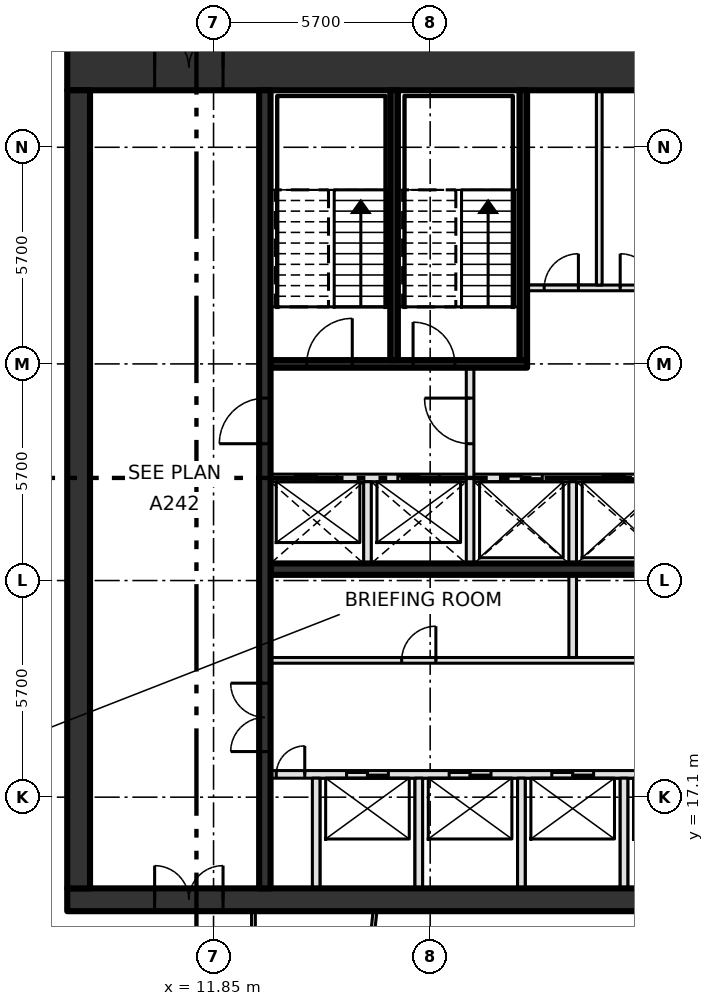
"""IFC4 building model, lengths in metres.
Left out: names, types, materials, properties, quantities, classifications, styles, units other than length and angle.
Written with IfcOpenShell. Run it as: python <this file> out.ifc"""

import sys

from ifc_helpers import new_model, si_unit, direction, frame, frame_2d, origin, place, context, subcontext, project, spatial, rectangle, extrude, element, fill, save


model = new_model("IFC4")
c1 = context("Model", 3, precision=1e-05, world=origin(), true_north=direction((0.0, 1.0)))
c2 = subcontext(c1, "Body", "Model", "MODEL_VIEW")
j1 = project(units=[si_unit("LENGTHUNIT", "METRE"), si_unit("PLANEANGLEUNIT", "RADIAN")], contexts=[c1])
p1 = place(None, origin())
s1 = spatial("IfcSite", under=j1, at=p1, CompositionType="ELEMENT")
p2 = place(p1, origin())
s2 = spatial("IfcBuilding", under=s1, at=p2, CompositionType="ELEMENT")
p3 = place(p2, frame((0.0, 0.0, 323.4)))
s3 = spatial("IfcBuildingStorey", under=s2, at=p3, CompositionType="ELEMENT", Elevation=323.4)
p4 = place(p3, frame((8.0, 14.4, -0.3), z_axis=(0.0, 0.0, 1.0), x_axis=(1.0, 0.0, 0.0)))
e1 = element("IfcWall", 1, at=p4, inside=s3, PredefinedType="SHEAR", context=c2, shape_type="SweptSolid", body=[
    extrude(rectangle(XDim=22.8, YDim=0.6, at=frame_2d((11.4, 0.0))), origin(), (0.0, 0.0, 1.0), 4.2),
])
p5 = place(p4, frame((2.3, 0.0, 0.3)))
e2 = element("IfcOpeningElement", 2, at=p5, cuts=e1, PredefinedType="OPENING", context=c2, shape_type="SweptSolid", body=[
    extrude(rectangle(XDim=1.8, YDim=2.1, at=frame_2d((0.9, 1.05))), frame((0.0, 0.31, 0.0), z_axis=(0.0, -1.0, 0.0), x_axis=(1.0, 0.0, 0.0)), (0.0, 0.0, 1.0), 0.62),
])
p6 = place(p3, frame((8.0, 36.3, -0.3), z_axis=(0.0, 0.0, 1.0), x_axis=(1.0, 0.0, 0.0)))
e3 = element("IfcWall", 3, at=p6, inside=s3, PredefinedType="SHEAR", context=c2, shape_type="SweptSolid", body=[
    extrude(rectangle(XDim=22.8, YDim=1.2, at=frame_2d((11.4, 0.0))), origin(), (0.0, 0.0, 1.0), 4.2),
])
p7 = place(p6, frame((2.3, 0.0, 0.3)))
e4 = element("IfcOpeningElement", 4, at=p7, cuts=e3, PredefinedType="OPENING", context=c2, shape_type="SweptSolid", body=[
    extrude(rectangle(XDim=1.8, YDim=2.1, at=frame_2d((0.9, 1.05))), frame((0.0, 0.61, 0.0), z_axis=(0.0, -1.0, 0.0), x_axis=(1.0, 0.0, 0.0)), (0.0, 0.0, 1.0), 1.22),
])
p8 = place(p3, frame((8.3, 14.7, -0.3), z_axis=(0.0, 0.0, 1.0), x_axis=(0.0, 1.0, 0.0)))
e5 = element("IfcWall", 5, at=p8, inside=s3, PredefinedType="SHEAR", context=c2, shape_type="SweptSolid", body=[
    extrude(rectangle(XDim=21.0, YDim=0.6, at=frame_2d((10.5, 0.0))), origin(), (0.0, 0.0, 1.0), 4.2),
])
p9 = place(p3, frame((13.35, 17.7, 0.0), z_axis=(0.0, 0.0, 1.0), x_axis=(1.0, 0.0, 0.0)))
e6 = element("IfcWall", 6, at=p9, inside=s3, PredefinedType="SOLIDWALL", context=c2, shape_type="SweptSolid", body=[
    extrude(rectangle(XDim=13.425, YDim=0.2, at=frame_2d((6.712, 0.0))), origin(), (0.0, 0.0, 1.0), 3.9),
])
p10 = place(p9, frame((2.0, 0.0, 0.0)))
e7 = element("IfcOpeningElement", 7, at=p10, cuts=e6, PredefinedType="OPENING", context=c2, shape_type="SweptSolid", body=[
    extrude(rectangle(XDim=1.1, YDim=2.1, at=frame_2d((0.55, 1.05))), frame((0.0, 0.11, 0.0), z_axis=(0.0, -1.0, 0.0), x_axis=(1.0, 0.0, 0.0)), (0.0, 0.0, 1.0), 0.22),
])
p11 = place(p9, frame((4.7, 0.0, 0.0)))
e8 = element("IfcOpeningElement", 8, at=p11, cuts=e6, PredefinedType="OPENING", context=c2, shape_type="SweptSolid", body=[
    extrude(rectangle(XDim=1.1, YDim=2.1, at=frame_2d((0.55, 1.05))), frame((0.0, 0.11, 0.0), z_axis=(0.0, -1.0, 0.0), x_axis=(1.0, 0.0, 0.0)), (0.0, 0.0, 1.0), 0.22),
])
p12 = place(p9, frame((7.4, 0.0, 0.0)))
e9 = element("IfcOpeningElement", 9, at=p12, cuts=e6, PredefinedType="OPENING", context=c2, shape_type="SweptSolid", body=[
    extrude(rectangle(XDim=1.1, YDim=2.1, at=frame_2d((0.55, 1.05))), frame((0.0, 0.11, 0.0), z_axis=(0.0, -1.0, 0.0), x_axis=(1.0, 0.0, 0.0)), (0.0, 0.0, 1.0), 0.22),
])
p13 = place(p9, frame((10.1, 0.0, 0.0)))
e10 = element("IfcOpeningElement", 10, at=p13, cuts=e6, PredefinedType="OPENING", context=c2, shape_type="SweptSolid", body=[
    extrude(rectangle(XDim=1.1, YDim=2.1, at=frame_2d((0.55, 1.05))), frame((0.0, 0.11, 0.0), z_axis=(0.0, -1.0, 0.0), x_axis=(1.0, 0.0, 0.0)), (0.0, 0.0, 1.0), 0.22),
])
p14 = place(p9, frame((0.15, 0.0, 0.0)))
e11 = element("IfcOpeningElement", 11, at=p14, cuts=e6, PredefinedType="OPENING", context=c2, shape_type="SweptSolid", body=[
    extrude(rectangle(XDim=0.75, YDim=2.1, at=frame_2d((0.375, 1.05))), frame((0.0, 0.11, 0.0), z_axis=(0.0, -1.0, 0.0), x_axis=(1.0, 0.0, 0.0)), (0.0, 0.0, 1.0), 0.22),
])
p15 = place(p9, frame((12.3, 0.0, 0.0)))
e12 = element("IfcOpeningElement", 12, at=p15, cuts=e6, PredefinedType="OPENING", context=c2, shape_type="SweptSolid", body=[
    extrude(rectangle(XDim=0.75, YDim=2.1, at=frame_2d((0.375, 1.05))), frame((0.0, 0.11, 0.0), z_axis=(0.0, -1.0, 0.0), x_axis=(1.0, 0.0, 0.0)), (0.0, 0.0, 1.0), 0.22),
])
p16 = place(p3, frame((13.35, 20.7, 0.0), z_axis=(0.0, 0.0, 1.0), x_axis=(1.0, 0.0, 0.0)))
e13 = element("IfcWall", 13, at=p16, inside=s3, PredefinedType="PARTITIONING", context=c2, shape_type="SweptSolid", body=[
    extrude(rectangle(XDim=13.425, YDim=0.15, at=frame_2d((6.712, 0.0))), origin(), (0.0, 0.0, 1.0), 3.9),
])
p17 = place(p16, frame((3.45, 0.0, 0.0)))
e14 = element("IfcOpeningElement", 14, at=p17, cuts=e13, PredefinedType="OPENING", context=c2, shape_type="SweptSolid", body=[
    extrude(rectangle(XDim=0.9, YDim=2.1, at=frame_2d((0.45, 1.05))), frame((0.0, 0.085, 0.0), z_axis=(0.0, -1.0, 0.0), x_axis=(1.0, 0.0, 0.0)), (0.0, 0.0, 1.0), 0.17),
])
p18 = place(p16, frame((10.2, 0.0, 0.0)))
e15 = element("IfcOpeningElement", 15, at=p18, cuts=e13, PredefinedType="OPENING", context=c2, shape_type="SweptSolid", body=[
    extrude(rectangle(XDim=0.9, YDim=2.1, at=frame_2d((0.45, 1.05))), frame((0.0, 0.085, 0.0), z_axis=(0.0, -1.0, 0.0), x_axis=(1.0, 0.0, 0.0)), (0.0, 0.0, 1.0), 0.17),
])
p19 = place(p3, frame((13.35, 23.1, 0.0), z_axis=(0.0, 0.0, 1.0), x_axis=(1.0, 0.0, 0.0)))
e16 = element("IfcWall", 16, at=p19, inside=s3, PredefinedType="SHEAR", context=c2, shape_type="SweptSolid", body=[
    extrude(rectangle(XDim=16.85, YDim=0.3, at=frame_2d((8.425, 0.0))), origin(), (0.0, 0.0, 1.0), 3.9),
])
p20 = place(p3, frame((13.35, 25.5, 0.0), z_axis=(0.0, 0.0, 1.0), x_axis=(1.0, 0.0, 0.0)))
e17 = element("IfcWall", 17, at=p20, inside=s3, PredefinedType="SOLIDWALL", context=c2, shape_type="SweptSolid", body=[
    extrude(rectangle(XDim=16.85, YDim=0.2, at=frame_2d((8.425, 0.0))), origin(), (0.0, 0.0, 1.0), 3.9),
])
p21 = place(p20, frame((0.65, 0.0, 0.0)))
e18 = element("IfcOpeningElement", 18, at=p21, cuts=e17, PredefinedType="OPENING", context=c2, shape_type="SweptSolid", body=[
    extrude(rectangle(XDim=1.1, YDim=2.1, at=frame_2d((0.55, 1.05))), frame((0.0, 0.11, 0.0), z_axis=(0.0, -1.0, 0.0), x_axis=(1.0, 0.0, 0.0)), (0.0, 0.0, 1.0), 0.22),
])
p22 = place(p20, frame((3.35, 0.0, 0.0)))
e19 = element("IfcOpeningElement", 19, at=p22, cuts=e17, PredefinedType="OPENING", context=c2, shape_type="SweptSolid", body=[
    extrude(rectangle(XDim=1.1, YDim=2.1, at=frame_2d((0.55, 1.05))), frame((0.0, 0.11, 0.0), z_axis=(0.0, -1.0, 0.0), x_axis=(1.0, 0.0, 0.0)), (0.0, 0.0, 1.0), 0.22),
])
p23 = place(p20, frame((6.05, 0.0, 0.0)))
e20 = element("IfcOpeningElement", 20, at=p23, cuts=e17, PredefinedType="OPENING", context=c2, shape_type="SweptSolid", body=[
    extrude(rectangle(XDim=1.1, YDim=2.1, at=frame_2d((0.55, 1.05))), frame((0.0, 0.11, 0.0), z_axis=(0.0, -1.0, 0.0), x_axis=(1.0, 0.0, 0.0)), (0.0, 0.0, 1.0), 0.22),
])
p24 = place(p20, frame((8.75, 0.0, 0.0)))
e21 = element("IfcOpeningElement", 21, at=p24, cuts=e17, PredefinedType="OPENING", context=c2, shape_type="SweptSolid", body=[
    extrude(rectangle(XDim=1.1, YDim=2.1, at=frame_2d((0.55, 1.05))), frame((0.0, 0.11, 0.0), z_axis=(0.0, -1.0, 0.0), x_axis=(1.0, 0.0, 0.0)), (0.0, 0.0, 1.0), 0.22),
])
p25 = place(p20, frame((13.0, 0.0, 0.0)))
e22 = element("IfcOpeningElement", 22, at=p25, cuts=e17, PredefinedType="OPENING", context=c2, shape_type="SweptSolid", body=[
    extrude(rectangle(XDim=0.9, YDim=2.1, at=frame_2d((0.45, 1.05))), frame((0.0, 0.11, 0.0), z_axis=(0.0, -1.0, 0.0), x_axis=(1.0, 0.0, 0.0)), (0.0, 0.0, 1.0), 0.22),
])
p26 = place(p3, frame((13.35, 28.5, 0.0), z_axis=(0.0, 0.0, 1.0), x_axis=(1.0, 0.0, 0.0)))
e23 = element("IfcWall", 23, at=p26, inside=s3, PredefinedType="SOLIDWALL", context=c2, shape_type="SweptSolid", body=[
    extrude(rectangle(XDim=6.75, YDim=0.2, at=frame_2d((3.375, 0.0))), origin(), (0.0, 0.0, 1.0), 3.9),
])
p27 = place(p26, frame((0.95, 0.0, 0.0)))
e24 = element("IfcOpeningElement", 24, at=p27, cuts=e23, PredefinedType="OPENING", context=c2, shape_type="SweptSolid", body=[
    extrude(rectangle(XDim=1.2, YDim=2.1, at=frame_2d((0.6, 1.05))), frame((0.0, 0.11, 0.0), z_axis=(0.0, -1.0, 0.0), x_axis=(1.0, 0.0, 0.0)), (0.0, 0.0, 1.0), 0.22),
])
p28 = place(p26, frame((3.75, 0.0, 0.0)))
e25 = element("IfcOpeningElement", 25, at=p28, cuts=e23, PredefinedType="OPENING", context=c2, shape_type="SweptSolid", body=[
    extrude(rectangle(XDim=1.1, YDim=2.1, at=frame_2d((0.55, 1.05))), frame((0.0, 0.11, 0.0), z_axis=(0.0, -1.0, 0.0), x_axis=(1.0, 0.0, 0.0)), (0.0, 0.0, 1.0), 0.22),
])
p29 = place(p3, frame((20.1, 30.5, 0.0), z_axis=(0.0, 0.0, 1.0), x_axis=(1.0, 0.0, 0.0)))
e26 = element("IfcWall", 26, at=p29, inside=s3, PredefinedType="PARTITIONING", context=c2, shape_type="SweptSolid", body=[
    extrude(rectangle(XDim=10.1, YDim=0.15, at=frame_2d((5.05, 0.0))), origin(), (0.0, 0.0, 1.0), 3.9),
])
p30 = place(p29, frame((0.45, 0.0, 0.0)))
e27 = element("IfcOpeningElement", 27, at=p30, cuts=e26, PredefinedType="OPENING", context=c2, shape_type="SweptSolid", body=[
    extrude(rectangle(XDim=0.9, YDim=2.1, at=frame_2d((0.45, 1.05))), frame((0.0, 0.085, 0.0), z_axis=(0.0, -1.0, 0.0), x_axis=(1.0, 0.0, 0.0)), (0.0, 0.0, 1.0), 0.17),
])
p31 = place(p29, frame((2.45, 0.0, 0.0)))
e28 = element("IfcOpeningElement", 28, at=p31, cuts=e26, PredefinedType="OPENING", context=c2, shape_type="SweptSolid", body=[
    extrude(rectangle(XDim=0.9, YDim=2.1, at=frame_2d((0.45, 1.05))), frame((0.0, 0.085, 0.0), z_axis=(0.0, -1.0, 0.0), x_axis=(1.0, 0.0, 0.0)), (0.0, 0.0, 1.0), 0.17),
])
p32 = place(p29, frame((6.25, 0.0, 0.0)))
e29 = element("IfcOpeningElement", 29, at=p32, cuts=e26, PredefinedType="OPENING", context=c2, shape_type="SweptSolid", body=[
    extrude(rectangle(XDim=0.9, YDim=2.1, at=frame_2d((0.45, 1.05))), frame((0.0, 0.085, 0.0), z_axis=(0.0, -1.0, 0.0), x_axis=(1.0, 0.0, 0.0)), (0.0, 0.0, 1.0), 0.17),
])
p33 = place(p3, frame((13.2, 14.7, 0.0), z_axis=(0.0, 0.0, 1.0), x_axis=(0.0, 1.0, 0.0)))
e30 = element("IfcWall", 30, at=p33, inside=s3, PredefinedType="SHEAR", context=c2, shape_type="SweptSolid", body=[
    extrude(rectangle(XDim=21.0, YDim=0.3, at=frame_2d((10.5, 0.0))), origin(), (0.0, 0.0, 1.0), 3.9),
])
p34 = place(p33, frame((3.6, 0.0, 0.0)))
e31 = element("IfcOpeningElement", 31, at=p34, cuts=e30, PredefinedType="OPENING", context=c2, shape_type="SweptSolid", body=[
    extrude(rectangle(XDim=1.8, YDim=2.1, at=frame_2d((0.9, 1.05))), frame((0.0, 0.16, 0.0), z_axis=(0.0, -1.0, 0.0), x_axis=(1.0, 0.0, 0.0)), (0.0, 0.0, 1.0), 0.32),
])
p35 = place(p33, frame((11.7, 0.0, 0.0)))
e32 = element("IfcOpeningElement", 32, at=p35, cuts=e30, PredefinedType="OPENING", context=c2, shape_type="SweptSolid", body=[
    extrude(rectangle(XDim=1.2, YDim=2.1, at=frame_2d((0.6, 1.05))), frame((0.0, 0.16, 0.0), z_axis=(0.0, -1.0, 0.0), x_axis=(1.0, 0.0, 0.0)), (0.0, 0.0, 1.0), 0.32),
])
p36 = place(p3, frame((14.55, 14.7, 0.0), z_axis=(0.0, 0.0, 1.0), x_axis=(0.0, 1.0, 0.0)))
e33 = element("IfcWall", 33, at=p36, inside=s3, PredefinedType="SOLIDWALL", context=c2, shape_type="SweptSolid", body=[
    extrude(rectangle(XDim=2.9, YDim=0.2, at=frame_2d((1.45, 0.0))), origin(), (0.0, 0.0, 1.0), 3.9),
])
p37 = place(p3, frame((15.9, 23.25, 0.0), z_axis=(0.0, 0.0, 1.0), x_axis=(0.0, 1.0, 0.0)))
e34 = element("IfcWall", 34, at=p37, inside=s3, PredefinedType="SOLIDWALL", context=c2, shape_type="SweptSolid", body=[
    extrude(rectangle(XDim=2.15, YDim=0.2, at=frame_2d((1.075, 0.0))), origin(), (0.0, 0.0, 1.0), 3.9),
])
p38 = place(p3, frame((16.6, 28.6, 0.0), z_axis=(0.0, 0.0, 1.0), x_axis=(0.0, 1.0, 0.0)))
e35 = element("IfcWall", 35, at=p38, inside=s3, PredefinedType="SOLIDWALL", context=c2, shape_type="SweptSolid", body=[
    extrude(rectangle(XDim=7.1, YDim=0.2, at=frame_2d((3.55, 0.0))), origin(), (0.0, 0.0, 1.0), 3.9),
])
p39 = place(p3, frame((17.25, 14.7, 0.0), z_axis=(0.0, 0.0, 1.0), x_axis=(0.0, 1.0, 0.0)))
e36 = element("IfcWall", 36, at=p39, inside=s3, PredefinedType="SOLIDWALL", context=c2, shape_type="SweptSolid", body=[
    extrude(rectangle(XDim=2.9, YDim=0.2, at=frame_2d((1.45, 0.0))), origin(), (0.0, 0.0, 1.0), 3.9),
])
p40 = place(p3, frame((18.6, 23.25, 0.0), z_axis=(0.0, 0.0, 1.0), x_axis=(0.0, 1.0, 0.0)))
e37 = element("IfcWall", 37, at=p40, inside=s3, PredefinedType="SOLIDWALL", context=c2, shape_type="SweptSolid", body=[
    extrude(rectangle(XDim=5.15, YDim=0.2, at=frame_2d((2.575, 0.0))), origin(), (0.0, 0.0, 1.0), 3.9),
])
p41 = place(p40, frame((3.15, 0.0, 0.0)))
e38 = element("IfcOpeningElement", 38, at=p41, cuts=e37, PredefinedType="OPENING", context=c2, shape_type="SweptSolid", body=[
    extrude(rectangle(XDim=1.2, YDim=2.1, at=frame_2d((0.6, 1.05))), frame((0.0, 0.11, 0.0), z_axis=(0.0, -1.0, 0.0), x_axis=(1.0, 0.0, 0.0)), (0.0, 0.0, 1.0), 0.22),
])
p42 = place(p3, frame((19.95, 14.7, 0.0), z_axis=(0.0, 0.0, 1.0), x_axis=(0.0, 1.0, 0.0)))
e39 = element("IfcWall", 39, at=p42, inside=s3, PredefinedType="SOLIDWALL", context=c2, shape_type="SweptSolid", body=[
    extrude(rectangle(XDim=2.9, YDim=0.2, at=frame_2d((1.45, 0.0))), origin(), (0.0, 0.0, 1.0), 3.9),
])
p43 = place(p3, frame((20.0, 28.6, 0.0), z_axis=(0.0, 0.0, 1.0), x_axis=(0.0, 1.0, 0.0)))
e40 = element("IfcWall", 40, at=p43, inside=s3, PredefinedType="SOLIDWALL", context=c2, shape_type="SweptSolid", body=[
    extrude(rectangle(XDim=7.1, YDim=0.2, at=frame_2d((3.55, 0.0))), origin(), (0.0, 0.0, 1.0), 3.9),
])
p44 = place(p3, frame((21.3, 20.775, 0.0), z_axis=(0.0, 0.0, 1.0), x_axis=(0.0, 1.0, 0.0)))
e41 = element("IfcWall", 41, at=p44, inside=s3, PredefinedType="SOLIDWALL", context=c2, shape_type="SweptSolid", body=[
    extrude(rectangle(XDim=4.625, YDim=0.2, at=frame_2d((2.312, 0.0))), origin(), (0.0, 0.0, 1.0), 3.9),
])
p45 = place(p3, frame((22.0, 30.575, 0.0), z_axis=(0.0, 0.0, 1.0), x_axis=(0.0, 1.0, 0.0)))
e42 = element("IfcWall", 42, at=p45, inside=s3, PredefinedType="PARTITIONING", context=c2, shape_type="SweptSolid", body=[
    extrude(rectangle(XDim=5.125, YDim=0.15, at=frame_2d((2.562, 0.0))), origin(), (0.0, 0.0, 1.0), 3.9),
])
p46 = place(p3, frame((22.65, 14.7, 0.0), z_axis=(0.0, 0.0, 1.0), x_axis=(0.0, 1.0, 0.0)))
e43 = element("IfcWall", 43, at=p46, inside=s3, PredefinedType="SOLIDWALL", context=c2, shape_type="SweptSolid", body=[
    extrude(rectangle(XDim=2.9, YDim=0.2, at=frame_2d((1.45, 0.0))), origin(), (0.0, 0.0, 1.0), 3.9),
])
p47 = place(p3, frame((12.9, 10.078, 0.0), z_axis=(0.0, 0.0, 1.0), x_axis=(0.0, 1.0, 0.0)))
e44 = element("IfcWall", 44, at=p47, inside=s3, PredefinedType="PARTITIONING", context=c2, shape_type="SweptSolid", body=[
    extrude(rectangle(XDim=4.022, YDim=0.1, at=frame_2d((2.011, 0.0))), origin(), (0.0, 0.0, 1.0), 3.9),
])
p48 = place(p3, frame((15.554, 8.924, 0.0), z_axis=(0.0, 0.0, 1.0), x_axis=(0.104513853303, 0.994523430829, 0.0)))
e45 = element("IfcWall", 45, at=p48, inside=s3, PredefinedType="PARTITIONING", context=c2, shape_type="SweptSolid", body=[
    extrude(rectangle(XDim=5.205, YDim=0.1, at=frame_2d((2.602, 0.0))), origin(), (0.0, 0.0, 1.0), 3.9),
])
p49 = place(p10, origin())
e46 = element("IfcDoor", 46, at=p49, inside=s3, OperationType="SLIDING_TO_LEFT", PredefinedType="DOOR", context=c2, shape_type="SweptSolid", body=[
    extrude(rectangle(XDim=1.1, YDim=2.1, at=frame_2d((0.55, 1.05))), frame((0.0, 0.025, 0.0), z_axis=(0.0, -1.0, 0.0), x_axis=(1.0, 0.0, 0.0)), (0.0, 0.0, 1.0), 0.05),
])
fill(e7, e46)
p50 = place(p11, origin())
e47 = element("IfcDoor", 47, at=p50, inside=s3, OperationType="SLIDING_TO_LEFT", PredefinedType="DOOR", context=c2, shape_type="SweptSolid", body=[
    extrude(rectangle(XDim=1.1, YDim=2.1, at=frame_2d((0.55, 1.05))), frame((0.0, 0.025, 0.0), z_axis=(0.0, -1.0, 0.0), x_axis=(1.0, 0.0, 0.0)), (0.0, 0.0, 1.0), 0.05),
])
fill(e8, e47)
p51 = place(p12, origin())
e48 = element("IfcDoor", 48, at=p51, inside=s3, OperationType="SLIDING_TO_LEFT", PredefinedType="DOOR", context=c2, shape_type="SweptSolid", body=[
    extrude(rectangle(XDim=1.1, YDim=2.1, at=frame_2d((0.55, 1.05))), frame((0.0, 0.025, 0.0), z_axis=(0.0, -1.0, 0.0), x_axis=(1.0, 0.0, 0.0)), (0.0, 0.0, 1.0), 0.05),
])
fill(e9, e48)
p52 = place(p21, origin())
e49 = element("IfcDoor", 49, at=p52, inside=s3, OperationType="SLIDING_TO_LEFT", PredefinedType="DOOR", context=c2, shape_type="SweptSolid", body=[
    extrude(rectangle(XDim=1.1, YDim=2.1, at=frame_2d((0.55, 1.05))), frame((0.0, 0.025, 0.0), z_axis=(0.0, -1.0, 0.0), x_axis=(1.0, 0.0, 0.0)), (0.0, 0.0, 1.0), 0.05),
])
fill(e18, e49)
p53 = place(p22, origin())
e50 = element("IfcDoor", 50, at=p53, inside=s3, OperationType="SLIDING_TO_LEFT", PredefinedType="DOOR", context=c2, shape_type="SweptSolid", body=[
    extrude(rectangle(XDim=1.1, YDim=2.1, at=frame_2d((0.55, 1.05))), frame((0.0, 0.025, 0.0), z_axis=(0.0, -1.0, 0.0), x_axis=(1.0, 0.0, 0.0)), (0.0, 0.0, 1.0), 0.05),
])
fill(e19, e50)
p54 = place(p23, origin())
e51 = element("IfcDoor", 51, at=p54, inside=s3, OperationType="SLIDING_TO_LEFT", PredefinedType="DOOR", context=c2, shape_type="SweptSolid", body=[
    extrude(rectangle(XDim=1.1, YDim=2.1, at=frame_2d((0.55, 1.05))), frame((0.0, 0.025, 0.0), z_axis=(0.0, -1.0, 0.0), x_axis=(1.0, 0.0, 0.0)), (0.0, 0.0, 1.0), 0.05),
])
fill(e20, e51)
p55 = place(p24, origin())
e52 = element("IfcDoor", 52, at=p55, inside=s3, OperationType="SLIDING_TO_LEFT", PredefinedType="DOOR", context=c2, shape_type="SweptSolid", body=[
    extrude(rectangle(XDim=1.1, YDim=2.1, at=frame_2d((0.55, 1.05))), frame((0.0, 0.025, 0.0), z_axis=(0.0, -1.0, 0.0), x_axis=(1.0, 0.0, 0.0)), (0.0, 0.0, 1.0), 0.05),
])
fill(e21, e52)
p56 = place(p14, origin())
e53 = element("IfcDoor", 53, at=p56, inside=s3, OperationType="SINGLE_SWING_RIGHT", PredefinedType="DOOR", context=c2, shape_type="SweptSolid", body=[
    extrude(rectangle(XDim=0.75, YDim=2.1, at=frame_2d((0.375, 1.05))), frame((0.0, 0.025, 0.0), z_axis=(0.0, -1.0, 0.0), x_axis=(1.0, 0.0, 0.0)), (0.0, 0.0, 1.0), 0.05),
])
fill(e11, e53)
p57 = place(p17, origin())
e54 = element("IfcDoor", 54, at=p57, inside=s3, OperationType="SINGLE_SWING_RIGHT", PredefinedType="DOOR", context=c2, shape_type="SweptSolid", body=[
    extrude(rectangle(XDim=0.9, YDim=2.1, at=frame_2d((0.45, 1.05))), frame((0.0, 0.025, 0.0), z_axis=(0.0, -1.0, 0.0), x_axis=(1.0, 0.0, 0.0)), (0.0, 0.0, 1.0), 0.05),
])
fill(e14, e54)
p58 = place(p30, origin())
e55 = element("IfcDoor", 55, at=p58, inside=s3, OperationType="SINGLE_SWING_RIGHT", PredefinedType="DOOR", context=c2, shape_type="SweptSolid", body=[
    extrude(rectangle(XDim=0.9, YDim=2.1, at=frame_2d((0.45, 1.05))), frame((0.0, 0.025, 0.0), z_axis=(0.0, -1.0, 0.0), x_axis=(1.0, 0.0, 0.0)), (0.0, 0.0, 1.0), 0.05),
])
fill(e27, e55)
p59 = place(p31, origin())
e56 = element("IfcDoor", 56, at=p59, inside=s3, OperationType="SINGLE_SWING_LEFT", PredefinedType="DOOR", context=c2, shape_type="SweptSolid", body=[
    extrude(rectangle(XDim=0.9, YDim=2.1, at=frame_2d((0.45, 1.05))), frame((0.0, 0.025, 0.0), z_axis=(0.0, -1.0, 0.0), x_axis=(1.0, 0.0, 0.0)), (0.0, 0.0, 1.0), 0.05),
])
fill(e28, e56)
p60 = place(p27, origin())
e57 = element("IfcDoor", 57, at=p60, inside=s3, OperationType="SINGLE_SWING_RIGHT", PredefinedType="DOOR", context=c2, shape_type="SweptSolid", body=[
    extrude(rectangle(XDim=1.2, YDim=2.1, at=frame_2d((0.6, 1.05))), frame((0.0, 0.025, 0.0), z_axis=(0.0, -1.0, 0.0), x_axis=(1.0, 0.0, 0.0)), (0.0, 0.0, 1.0), 0.05),
])
fill(e24, e57)
p61 = place(p28, origin())
e58 = element("IfcDoor", 58, at=p61, inside=s3, OperationType="SINGLE_SWING_LEFT", PredefinedType="DOOR", context=c2, shape_type="SweptSolid", body=[
    extrude(rectangle(XDim=1.1, YDim=2.1, at=frame_2d((0.55, 1.05))), frame((0.0, 0.025, 0.0), z_axis=(0.0, -1.0, 0.0), x_axis=(1.0, 0.0, 0.0)), (0.0, 0.0, 1.0), 0.05),
])
fill(e25, e58)
p62 = place(p34, origin())
e59 = element("IfcDoor", 59, at=p62, inside=s3, OperationType="DOUBLE_DOOR_SINGLE_SWING", PredefinedType="DOOR", context=c2, shape_type="SweptSolid", body=[
    extrude(rectangle(XDim=1.8, YDim=2.1, at=frame_2d((0.9, 1.05))), frame((0.0, 0.025, 0.0), z_axis=(0.0, -1.0, 0.0), x_axis=(1.0, 0.0, 0.0)), (0.0, 0.0, 1.0), 0.05),
])
fill(e31, e59)
p63 = place(p35, origin())
e60 = element("IfcDoor", 60, at=p63, inside=s3, OperationType="SINGLE_SWING_LEFT", PredefinedType="DOOR", context=c2, shape_type="SweptSolid", body=[
    extrude(rectangle(XDim=1.2, YDim=2.1, at=frame_2d((0.6, 1.05))), frame((0.0, 0.025, 0.0), z_axis=(0.0, -1.0, 0.0), x_axis=(1.0, 0.0, 0.0)), (0.0, 0.0, 1.0), 0.05),
])
fill(e32, e60)
p64 = place(p41, origin())
e61 = element("IfcDoor", 61, at=p64, inside=s3, OperationType="SINGLE_SWING_RIGHT", PredefinedType="DOOR", context=c2, shape_type="SweptSolid", body=[
    extrude(rectangle(XDim=1.2, YDim=2.1, at=frame_2d((0.6, 1.05))), frame((0.0, 0.025, 0.0), z_axis=(0.0, -1.0, 0.0), x_axis=(1.0, 0.0, 0.0)), (0.0, 0.0, 1.0), 0.05),
])
fill(e38, e61)
p65 = place(p7, origin())
e62 = element("IfcDoor", 62, at=p65, inside=s3, OperationType="DOUBLE_DOOR_SINGLE_SWING", PredefinedType="DOOR", context=c2, shape_type="SweptSolid", body=[
    extrude(rectangle(XDim=1.8, YDim=2.1, at=frame_2d((0.9, 1.05))), frame((0.0, 0.025, 0.0), z_axis=(0.0, -1.0, 0.0), x_axis=(1.0, 0.0, 0.0)), (0.0, 0.0, 1.0), 0.05),
])
fill(e4, e62)
p66 = place(p5, origin())
e63 = element("IfcDoor", 63, at=p66, inside=s3, OperationType="DOUBLE_DOOR_SINGLE_SWING", PredefinedType="DOOR", context=c2, shape_type="SweptSolid", body=[
    extrude(rectangle(XDim=1.8, YDim=2.1, at=frame_2d((0.9, 1.05))), frame((0.0, 0.025, 0.0), z_axis=(0.0, -1.0, 0.0), x_axis=(1.0, 0.0, 0.0)), (0.0, 0.0, 1.0), 0.05),
])
fill(e2, e63)
save(model, sys.argv[1])
